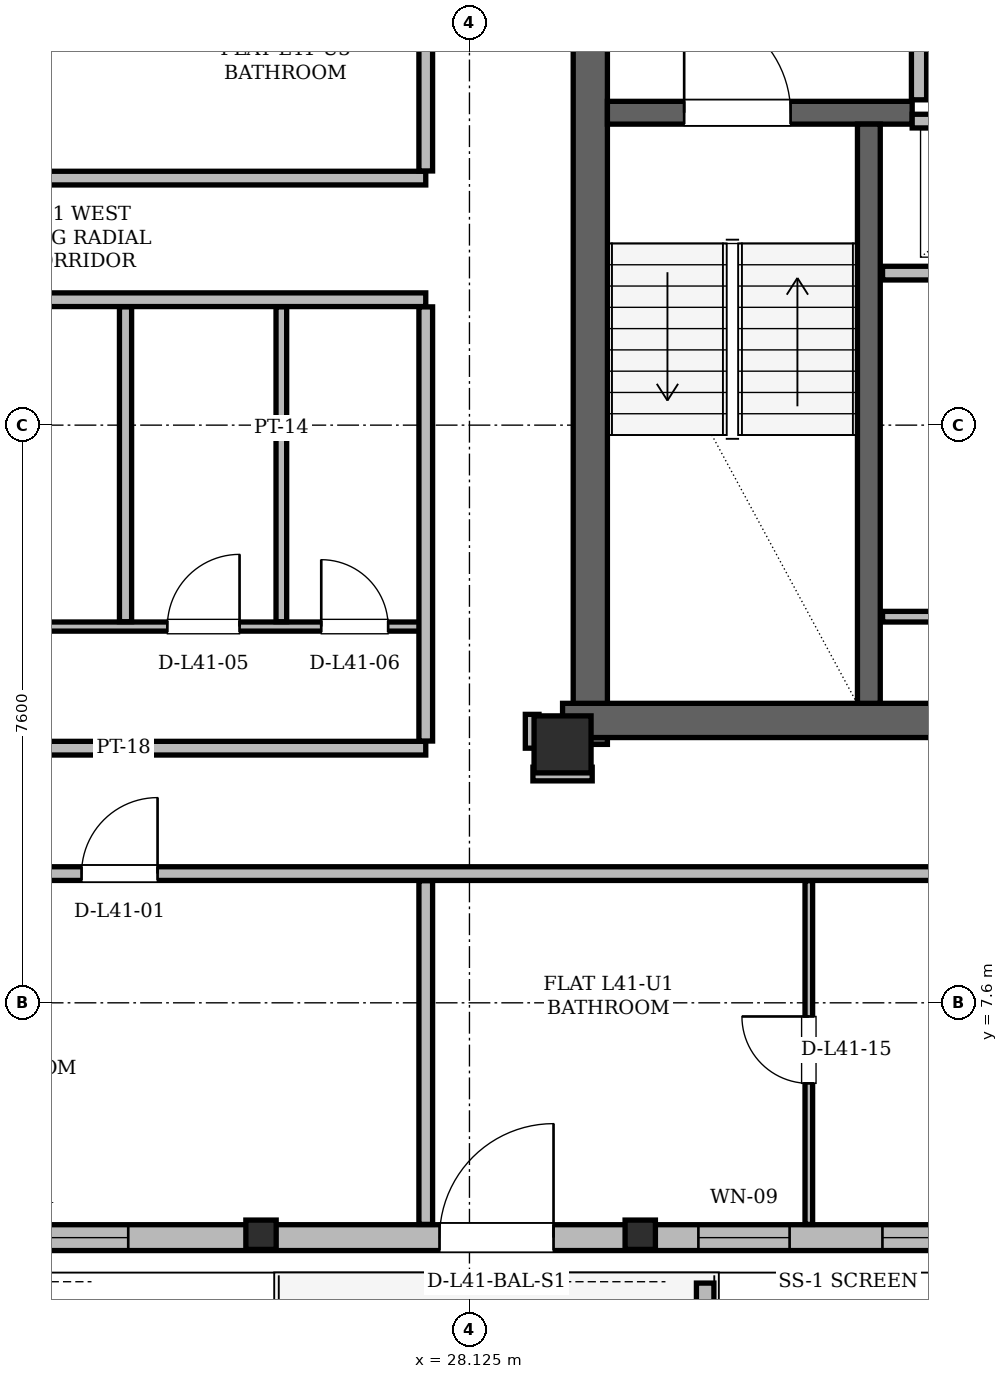
"""IFC4 building model, lengths in metres.
Left out: names, types, materials, properties, quantities, classifications, styles, units other than length and angle.
Written with IfcOpenShell. Run it as: python <this file> out.ifc"""

import sys

from ifc_helpers import new_model, si_unit, direction, frame, frame_2d, origin, origin_2d, place, context, subcontext, project, spatial, polyline, rectangle, hollow_rectangle, i_section, outline, extrude, element, fill, save


model = new_model("IFC4")
c1 = context("Model", 3, precision=1e-05, world=origin(), true_north=direction((0.0, 1.0)))
c2 = subcontext(c1, "Body", "Model", "MODEL_VIEW")
j1 = project(units=[si_unit("LENGTHUNIT", "METRE"), si_unit("PLANEANGLEUNIT", "RADIAN")], contexts=[c1])
p1 = place(None, origin())
s1 = spatial("IfcSite", under=j1, at=p1, CompositionType="ELEMENT")
p2 = place(p1, origin())
s2 = spatial("IfcBuilding", under=s1, at=p2, CompositionType="ELEMENT")
p3 = place(p2, frame((0.0, 0.0, 156.6)))
s3 = spatial("IfcBuildingStorey", under=s2, at=p3, CompositionType="ELEMENT", Elevation=156.6)
p4 = place(p3, frame((29.35, 11.0, 0.0), z_axis=(0.0, 0.0, 1.0), x_axis=(1.0, 0.0, 0.0)))
e1 = element("IfcColumn", 1, at=p4, inside=s3, PredefinedType="COLUMN", context=c2, shape_type="SweptSolid", body=[
    extrude(hollow_rectangle(XDim=0.75, YDim=0.75, WallThickness=0.06, at=origin_2d()), origin(), (0.0, 0.0, 1.0), 3.6),
])
p5 = place(p3, frame((25.394, 4.511, 0.004), z_axis=(-0.006253154148, 0.021138379783, 0.999757003958), x_axis=(-0.958922443526, -0.283668375577, 0.0)))
e2 = element("IfcColumn", 2, at=p5, inside=s3, PredefinedType="COLUMN", context=c2, shape_type="SweptSolid", body=[
    extrude(i_section(OverallWidth=0.399, OverallDepth=0.386, WebThickness=0.021, FlangeThickness=0.033, at=origin_2d()), origin(), (0.0, 0.0, 1.0), 3.592),
])
p6 = place(p3, frame((30.379, 4.511, 0.004), z_axis=(-0.003670376646, 0.021138650683, 0.999769816399), x_axis=(-0.985258221768, -0.171073774841, 0.0)))
e3 = element("IfcColumn", 3, at=p6, inside=s3, PredefinedType="COLUMN", context=c2, shape_type="SweptSolid", body=[
    extrude(i_section(OverallWidth=0.399, OverallDepth=0.386, WebThickness=0.021, FlangeThickness=0.033, at=origin_2d()), origin(), (0.0, 0.0, 1.0), 3.592),
])
p7 = place(p3, frame((29.715, 11.0, 0.0), z_axis=(0.0, 0.0, 1.0), x_axis=(0.0, 1.0, 0.0)))
e4 = element("IfcWall", 4, at=p7, inside=s3, PredefinedType="SHEAR", context=c2, shape_type="SweptSolid", body=[
    extrude(rectangle(XDim=13.3, YDim=0.45, at=frame_2d((6.65, 0.0))), origin(), (0.0, 0.0, 1.0), 3.38),
])
p8 = place(p3, frame((29.35, 11.315, 0.0), z_axis=(0.0, 0.0, 1.0), x_axis=(1.0, 0.0, 0.0)))
e5 = element("IfcWall", 5, at=p8, inside=s3, PredefinedType="SHEAR", context=c2, shape_type="SweptSolid", body=[
    extrude(rectangle(XDim=7.1, YDim=0.45, at=frame_2d((3.55, 0.0))), origin(), (0.0, 0.0, 1.0), 3.38),
])
p9 = place(p3, frame((29.94, 19.31, 0.0), z_axis=(0.0, 0.0, 1.0), x_axis=(1.0, 0.0, 0.0)))
e6 = element("IfcWall", 6, at=p9, inside=s3, PredefinedType="SHEAR", context=c2, shape_type="SweptSolid", body=[
    extrude(rectangle(XDim=4.01, YDim=0.3, at=frame_2d((2.005, 0.0))), origin(), (0.0, 0.0, 1.0), 3.38),
])
p10 = place(p9, frame((1.01, 0.0, 0.0)))
e7 = element("IfcOpeningElement", 7, at=p10, cuts=e6, PredefinedType="OPENING", context=c2, shape_type="SweptSolid", body=[
    extrude(rectangle(XDim=1.4, YDim=2.2, at=frame_2d((0.7, 1.1))), frame((0.0, 0.15, 0.0), z_axis=(0.0, -1.0, 0.0), x_axis=(1.0, 0.0, 0.0)), (0.0, 0.0, 1.0), 0.3),
])
p11 = place(p3, frame((33.38, 11.54, 0.0), z_axis=(0.0, 0.0, 1.0), x_axis=(0.0, 1.0, 0.0)))
e8 = element("IfcWall", 8, at=p11, inside=s3, PredefinedType="SHEAR", context=c2, shape_type="SweptSolid", body=[
    extrude(rectangle(XDim=7.62, YDim=0.3, at=frame_2d((3.81, 0.0))), origin(), (0.0, 0.0, 1.0), 3.38),
])
p12 = place(p3, frame((19.697, 4.511, 0.0), z_axis=(0.0, 0.0, 1.0), x_axis=(1.0, 0.0, 0.0)))
e9 = element("IfcWall", 9, at=p12, inside=s3, PredefinedType="SOLIDWALL", context=c2, shape_type="SweptSolid", body=[
    extrude(rectangle(XDim=35.606, YDim=0.34, at=frame_2d((17.803, 0.0))), origin(), (0.0, 0.0, 1.0), 2.6),
])
p13 = place(p12, frame((8.034, 0.0, 0.0)))
e10 = element("IfcOpeningElement", 10, at=p13, cuts=e9, PredefinedType="OPENING", context=c2, shape_type="SweptSolid", body=[
    extrude(rectangle(XDim=1.5, YDim=2.2, at=frame_2d((0.75, 1.1))), frame((0.0, 0.17, 0.0), z_axis=(0.0, -1.0, 0.0), x_axis=(1.0, 0.0, 0.0)), (0.0, 0.0, 1.0), 0.34),
])
p14 = place(p12, frame((27.737, 0.0, 0.0)))
e11 = element("IfcOpeningElement", 11, at=p14, cuts=e9, PredefinedType="OPENING", context=c2, shape_type="SweptSolid", body=[
    extrude(rectangle(XDim=1.5, YDim=2.2, at=frame_2d((0.75, 1.1))), frame((0.0, 0.17, 0.0), z_axis=(0.0, -1.0, 0.0), x_axis=(1.0, 0.0, 0.0)), (0.0, 0.0, 1.0), 0.34),
])
p15 = place(p12, frame((13.862, 0.0, 0.85)))
e12 = element("IfcOpeningElement", 12, at=p15, cuts=e9, PredefinedType="OPENING", context=c2, shape_type="SweptSolid", body=[
    extrude(rectangle(XDim=3.0, YDim=1.64, at=frame_2d((1.5, 0.82))), frame((0.0, 0.17, 0.0), z_axis=(0.0, -1.0, 0.0), x_axis=(1.0, 0.0, 0.0)), (0.0, 0.0, 1.0), 0.34),
])
p16 = place(p12, frame((20.838, 0.0, 0.85)))
e13 = element("IfcOpeningElement", 13, at=p16, cuts=e9, PredefinedType="OPENING", context=c2, shape_type="SweptSolid", body=[
    extrude(rectangle(XDim=2.6, YDim=1.64, at=frame_2d((1.3, 0.82))), frame((0.0, 0.17, 0.0), z_axis=(0.0, -1.0, 0.0), x_axis=(1.0, 0.0, 0.0)), (0.0, 0.0, 1.0), 0.34),
])
p17 = place(p12, frame((11.44, 0.0, 0.85)))
e14 = element("IfcOpeningElement", 14, at=p17, cuts=e9, PredefinedType="OPENING", context=c2, shape_type="SweptSolid", body=[
    extrude(rectangle(XDim=1.2, YDim=1.48, at=frame_2d((0.6, 0.74))), frame((0.0, 0.17, 0.0), z_axis=(0.0, -1.0, 0.0), x_axis=(1.0, 0.0, 0.0)), (0.0, 0.0, 1.0), 0.34),
])
p18 = place(p12, frame((1.139, 0.0, 0.85)))
e15 = element("IfcOpeningElement", 15, at=p18, cuts=e9, PredefinedType="OPENING", context=c2, shape_type="SweptSolid", body=[
    extrude(rectangle(XDim=2.8, YDim=1.64, at=frame_2d((1.4, 0.82))), frame((0.0, 0.17, 0.0), z_axis=(0.0, -1.0, 0.0), x_axis=(1.0, 0.0, 0.0)), (0.0, 0.0, 1.0), 0.34),
])
p19 = place(p12, frame((31.095, 0.0, 0.85)))
e16 = element("IfcOpeningElement", 16, at=p19, cuts=e9, PredefinedType="OPENING", context=c2, shape_type="SweptSolid", body=[
    extrude(rectangle(XDim=3.0, YDim=1.64, at=frame_2d((1.5, 0.82))), frame((0.0, 0.17, 0.0), z_axis=(0.0, -1.0, 0.0), x_axis=(1.0, 0.0, 0.0)), (0.0, 0.0, 1.0), 0.34),
])
p20 = place(p3, frame((32.901, 43.313, 0.0), z_axis=(0.0, 0.0, 1.0), x_axis=(-0.499998839087, -0.866026074037, 0.0)))
e17 = element("IfcWall", 17, at=p20, inside=s3, PredefinedType="SOLIDWALL", context=c2, shape_type="SweptSolid", body=[
    extrude(rectangle(XDim=35.606, YDim=0.34, at=frame_2d((17.803, 0.0))), origin(), (0.0, 0.0, 1.0), 2.6),
])
p21 = place(p20, frame((8.034, 0.0, 0.0)))
e18 = element("IfcOpeningElement", 18, at=p21, cuts=e17, PredefinedType="OPENING", context=c2, shape_type="SweptSolid", body=[
    extrude(rectangle(XDim=1.5, YDim=2.2, at=frame_2d((0.75, 1.1))), frame((0.0, 0.17, 0.0), z_axis=(0.0, -1.0, 0.0), x_axis=(1.0, 0.0, 0.0)), (0.0, 0.0, 1.0), 0.34),
])
p22 = place(p20, frame((30.887, 0.0, 0.0)))
e19 = element("IfcOpeningElement", 19, at=p22, cuts=e17, PredefinedType="OPENING", context=c2, shape_type="SweptSolid", body=[
    extrude(rectangle(XDim=1.5, YDim=2.2, at=frame_2d((0.75, 1.1))), frame((0.0, 0.17, 0.0), z_axis=(0.0, -1.0, 0.0), x_axis=(1.0, 0.0, 0.0)), (0.0, 0.0, 1.0), 0.34),
])
p23 = place(p20, frame((33.096, 0.0, 0.85)))
e20 = element("IfcOpeningElement", 20, at=p23, cuts=e17, PredefinedType="OPENING", context=c2, shape_type="SweptSolid", body=[
    extrude(rectangle(XDim=1.2, YDim=1.48, at=frame_2d((0.6, 0.74))), frame((0.0, 0.17, 0.0), z_axis=(0.0, -1.0, 0.0), x_axis=(1.0, 0.0, 0.0)), (0.0, 0.0, 1.0), 0.34),
])
p24 = place(p20, frame((13.168, 0.0, 0.85)))
e21 = element("IfcOpeningElement", 21, at=p24, cuts=e17, PredefinedType="OPENING", context=c2, shape_type="SweptSolid", body=[
    extrude(rectangle(XDim=1.2, YDim=1.48, at=frame_2d((0.6, 0.74))), frame((0.0, 0.17, 0.0), z_axis=(0.0, -1.0, 0.0), x_axis=(1.0, 0.0, 0.0)), (0.0, 0.0, 1.0), 0.34),
])
p25 = place(p20, frame((20.876, 0.0, 0.85)))
e22 = element("IfcOpeningElement", 22, at=p25, cuts=e17, PredefinedType="OPENING", context=c2, shape_type="SweptSolid", body=[
    extrude(rectangle(XDim=2.8, YDim=1.64, at=frame_2d((1.4, 0.82))), frame((0.0, 0.17, 0.0), z_axis=(0.0, -1.0, 0.0), x_axis=(1.0, 0.0, 0.0)), (0.0, 0.0, 1.0), 0.34),
])
p26 = place(p20, frame((2.906, 0.0, 0.85)))
e23 = element("IfcOpeningElement", 23, at=p26, cuts=e17, PredefinedType="OPENING", context=c2, shape_type="SweptSolid", body=[
    extrude(rectangle(XDim=1.6, YDim=1.64, at=frame_2d((0.8, 0.82))), frame((0.0, 0.17, 0.0), z_axis=(0.0, -1.0, 0.0), x_axis=(1.0, 0.0, 0.0)), (0.0, 0.0, 1.0), 0.34),
])
p27 = place(p3, frame((31.226, 3.913, 0.0), z_axis=(0.0, 0.0, 1.0), x_axis=(0.0, -1.0, 0.0)))
e24 = element("IfcWall", 24, at=p27, inside=s3, PredefinedType="PARAPET", context=c2, shape_type="SweptSolid", body=[
    extrude(outline(polyline([(0.0, 0.0), (2.042, 0.0), (2.042, 1.1), (0.0, 1.32), (0.0, 0.0)])), frame((0.0, 0.115, 0.0), z_axis=(0.0, -1.0, 0.0), x_axis=(1.0, 0.0, 0.0)), (0.0, 0.0, 1.0), 0.23),
])
p28 = place(p3, frame((34.04, 19.48, 0.0), z_axis=(0.0, 0.0, 1.0), x_axis=(0.0, 1.0, 0.0)))
e25 = element("IfcWall", 25, at=p28, inside=s3, PredefinedType="PARTITIONING", context=c2, shape_type="SweptSolid", body=[
    extrude(rectangle(XDim=4.5, YDim=0.2, at=frame_2d((2.25, 0.0))), origin(), (0.0, 0.0, 1.0), 2.42),
])
p29 = place(p28, frame((2.12, 0.0, 0.0)))
e26 = element("IfcOpeningElement", 26, at=p29, cuts=e25, PredefinedType="OPENING", context=c2, shape_type="SweptSolid", body=[
    extrude(rectangle(XDim=1.1, YDim=2.2, at=frame_2d((0.55, 1.1))), frame((0.0, 0.1, 0.0), z_axis=(0.0, -1.0, 0.0), x_axis=(1.0, 0.0, 0.0)), (0.0, 0.0, 1.0), 0.2),
])
p30 = place(p3, frame((33.95, 19.2, 0.0), z_axis=(0.0, 0.0, 1.0), x_axis=(1.0, 0.0, 0.0)))
e27 = element("IfcWall", 27, at=p30, inside=s3, PredefinedType="PARTITIONING", context=c2, shape_type="SweptSolid", body=[
    extrude(rectangle(XDim=2.27, YDim=0.18, at=frame_2d((1.135, 0.0))), origin(), (0.0, 0.0, 1.0), 3.38),
])
p31 = place(p3, frame((33.56, 17.2, 0.0), z_axis=(0.0, 0.0, 1.0), x_axis=(1.0, 0.0, 0.0)))
e28 = element("IfcWall", 28, at=p31, inside=s3, PredefinedType="PARTITIONING", context=c2, shape_type="SweptSolid", body=[
    extrude(rectangle(XDim=2.66, YDim=0.18, at=frame_2d((1.33, 0.0))), origin(), (0.0, 0.0, 1.0), 3.38),
])
p32 = place(p3, frame((33.56, 12.68, 0.0), z_axis=(0.0, 0.0, 1.0), x_axis=(1.0, 0.0, 0.0)))
e29 = element("IfcWall", 29, at=p32, inside=s3, PredefinedType="PARTITIONING", context=c2, shape_type="SweptSolid", body=[
    extrude(rectangle(XDim=2.66, YDim=0.14, at=frame_2d((1.33, 0.0))), origin(), (0.0, 0.0, 1.0), 3.38),
])
p33 = place(p3, frame((19.6, 9.3, 0.0), z_axis=(0.0, 0.0, 1.0), x_axis=(1.0, 0.0, 0.0)))
e30 = element("IfcWall", 30, at=p33, inside=s3, PredefinedType="PARTITIONING", context=c2, shape_type="SweptSolid", body=[
    extrude(rectangle(XDim=30.4, YDim=0.18, at=frame_2d((15.2, 0.0))), origin(), (0.0, 0.0, 1.0), 2.842),
])
p34 = place(p33, frame((3.421, 0.0, 0.0)))
e31 = element("IfcOpeningElement", 31, at=p34, cuts=e30, PredefinedType="OPENING", context=c2, shape_type="SweptSolid", body=[
    extrude(rectangle(XDim=1.0, YDim=2.18, at=frame_2d((0.5, 1.09))), frame((0.0, 0.09, 0.0), z_axis=(0.0, -1.0, 0.0), x_axis=(1.0, 0.0, 0.0)), (0.0, 0.0, 1.0), 0.18),
])
p35 = place(p33, frame((18.902, 0.0, 0.0)))
e32 = element("IfcOpeningElement", 32, at=p35, cuts=e30, PredefinedType="OPENING", context=c2, shape_type="SweptSolid", body=[
    extrude(rectangle(XDim=1.0, YDim=2.18, at=frame_2d((0.5, 1.09))), frame((0.0, 0.09, 0.0), z_axis=(0.0, -1.0, 0.0), x_axis=(1.0, 0.0, 0.0)), (0.0, 0.0, 1.0), 0.18),
])
p36 = place(p33, frame((28.532, 0.0, 0.0)))
e33 = element("IfcOpeningElement", 33, at=p36, cuts=e30, PredefinedType="OPENING", context=c2, shape_type="SweptSolid", body=[
    extrude(rectangle(XDim=1.0, YDim=2.18, at=frame_2d((0.5, 1.09))), frame((0.0, 0.09, 0.0), z_axis=(0.0, -1.0, 0.0), x_axis=(1.0, 0.0, 0.0)), (0.0, 0.0, 1.0), 0.18),
])
p37 = place(p3, frame((28.96, 10.61, 0.0), z_axis=(0.0, 0.0, 1.0), x_axis=(1.0, 0.0, 0.0)))
e34 = element("IfcWall", 34, at=p37, inside=s3, PredefinedType="PARTITIONING", context=c2, shape_type="SweptSolid", body=[
    extrude(rectangle(XDim=0.78, YDim=0.18, at=frame_2d((0.39, 0.0))), origin(), (0.0, 0.0, 1.0), 3.38),
])
p38 = place(p3, frame((19.6, 10.95, 0.0), z_axis=(0.0, 0.0, 1.0), x_axis=(1.0, 0.0, 0.0)))
e35 = element("IfcWall", 35, at=p38, inside=s3, PredefinedType="PARTITIONING", context=c2, shape_type="SweptSolid", body=[
    extrude(rectangle(XDim=7.95, YDim=0.18, at=frame_2d((3.975, 0.0))), origin(), (0.0, 0.0, 1.0), 3.38),
])
p39 = place(p3, frame((15.487, 12.55, 0.0), z_axis=(0.0, 0.0, 1.0), x_axis=(1.0, 0.0, 0.0)))
e36 = element("IfcWall", 36, at=p39, inside=s3, PredefinedType="PARTITIONING", context=c2, shape_type="SweptSolid", body=[
    extrude(rectangle(XDim=12.113, YDim=0.12, at=frame_2d((6.056, 0.0))), origin(), (0.0, 0.0, 1.0), 3.38),
])
p40 = place(p39, frame((3.494, 0.0, 0.0)))
e37 = element("IfcOpeningElement", 37, at=p40, cuts=e36, PredefinedType="OPENING", context=c2, shape_type="SweptSolid", body=[
    extrude(rectangle(XDim=0.92, YDim=2.12, at=frame_2d((0.46, 1.06))), frame((0.0, 0.06, 0.0), z_axis=(0.0, -1.0, 0.0), x_axis=(1.0, 0.0, 0.0)), (0.0, 0.0, 1.0), 0.12),
])
p41 = place(p39, frame((8.663, 0.0, 0.0)))
e38 = element("IfcOpeningElement", 38, at=p41, cuts=e36, PredefinedType="OPENING", context=c2, shape_type="SweptSolid", body=[
    extrude(rectangle(XDim=0.95, YDim=2.1, at=frame_2d((0.475, 1.05))), frame((0.0, 0.06, 0.0), z_axis=(0.0, -1.0, 0.0), x_axis=(1.0, 0.0, 0.0)), (0.0, 0.0, 1.0), 0.12),
])
p42 = place(p39, frame((10.688, 0.0, 0.0)))
e39 = element("IfcOpeningElement", 39, at=p42, cuts=e36, PredefinedType="OPENING", context=c2, shape_type="SweptSolid", body=[
    extrude(rectangle(XDim=0.88, YDim=2.08, at=frame_2d((0.44, 1.04))), frame((0.0, 0.06, 0.0), z_axis=(0.0, -1.0, 0.0), x_axis=(1.0, 0.0, 0.0)), (0.0, 0.0, 1.0), 0.12),
])
p43 = place(p3, frame((17.823, 16.85, 0.0), z_axis=(0.0, 0.0, 1.0), x_axis=(1.0, 0.0, 0.0)))
e40 = element("IfcWall", 40, at=p43, inside=s3, PredefinedType="PARTITIONING", context=c2, shape_type="SweptSolid", body=[
    extrude(rectangle(XDim=9.727, YDim=0.18, at=frame_2d((4.863, 0.0))), origin(), (0.0, 0.0, 1.0), 3.38),
])
p44 = place(p3, frame((18.747, 18.45, 0.0), z_axis=(0.0, 0.0, 1.0), x_axis=(1.0, 0.0, 0.0)))
e41 = element("IfcWall", 41, at=p44, inside=s3, PredefinedType="PARTITIONING", context=c2, shape_type="SweptSolid", body=[
    extrude(rectangle(XDim=8.803, YDim=0.18, at=frame_2d((4.401, 0.0))), origin(), (0.0, 0.0, 1.0), 3.38),
])
p45 = place(p3, frame((23.6, 12.614, 0.0), z_axis=(0.0, 0.0, 1.0), x_axis=(0.0, 1.0, 0.0)))
e42 = element("IfcWall", 42, at=p45, inside=s3, PredefinedType="PARTITIONING", context=c2, shape_type="SweptSolid", body=[
    extrude(rectangle(XDim=4.142, YDim=0.16, at=frame_2d((2.071, 0.0))), origin(), (0.0, 0.0, 1.0), 3.38),
])
p46 = place(p3, frame((25.65, 12.614, 0.0), z_axis=(0.0, 0.0, 1.0), x_axis=(0.0, 1.0, 0.0)))
e43 = element("IfcWall", 43, at=p46, inside=s3, PredefinedType="PARTITIONING", context=c2, shape_type="SweptSolid", body=[
    extrude(rectangle(XDim=4.142, YDim=0.14, at=frame_2d((2.071, 0.0))), origin(), (0.0, 0.0, 1.0), 3.38),
])
p47 = place(p3, frame((27.55, 4.685, 0.0), z_axis=(0.0, 0.0, 1.0), x_axis=(0.0, 1.0, 0.0)))
e44 = element("IfcWall", 44, at=p47, inside=s3, PredefinedType="PARTITIONING", context=c2, shape_type="SweptSolid", body=[
    extrude(rectangle(XDim=4.521, YDim=0.18, at=frame_2d((2.261, 0.0))), origin(), (0.0, 0.0, 1.0), 2.966),
])
p48 = place(p3, frame((27.55, 11.044, 0.0), z_axis=(0.0, 0.0, 1.0), x_axis=(0.0, 1.0, 0.0)))
e45 = element("IfcWall", 45, at=p48, inside=s3, PredefinedType="PARTITIONING", context=c2, shape_type="SweptSolid", body=[
    extrude(rectangle(XDim=5.712, YDim=0.18, at=frame_2d((2.856, 0.0))), origin(), (0.0, 0.0, 1.0), 2.842),
])
p49 = place(p3, frame((27.55, 18.544, 0.0), z_axis=(0.0, 0.0, 1.0), x_axis=(0.0, 1.0, 0.0)))
e46 = element("IfcWall", 46, at=p49, inside=s3, PredefinedType="PARTITIONING", context=c2, shape_type="SweptSolid", body=[
    extrude(rectangle(XDim=15.153, YDim=0.18, at=frame_2d((7.576, 0.0))), origin(), (0.0, 0.0, 1.0), 3.38),
])
p50 = place(p49, frame((3.68, 0.0, 0.0)))
e47 = element("IfcOpeningElement", 47, at=p50, cuts=e46, PredefinedType="OPENING", context=c2, shape_type="SweptSolid", body=[
    extrude(rectangle(XDim=1.0, YDim=2.18, at=frame_2d((0.5, 1.09))), frame((0.0, 0.09, 0.0), z_axis=(0.0, -1.0, 0.0), x_axis=(1.0, 0.0, 0.0)), (0.0, 0.0, 1.0), 0.18),
])
p51 = place(p3, frame((28.95, 10.95, 0.0), z_axis=(0.0, 0.0, 1.0), x_axis=(0.0, 1.0, 0.0)))
e48 = element("IfcWall", 48, at=p51, inside=s3, PredefinedType="PARTITIONING", context=c2, shape_type="SweptSolid", body=[
    extrude(rectangle(XDim=0.445, YDim=0.18, at=frame_2d((0.223, 0.0))), origin(), (0.0, 0.0, 1.0), 2.842),
])
p52 = place(p3, frame((32.59, 4.685, 0.0), z_axis=(0.0, 0.0, 1.0), x_axis=(0.0, 1.0, 0.0)))
e49 = element("IfcWall", 49, at=p52, inside=s3, PredefinedType="PARTITIONING", context=c2, shape_type="SweptSolid", body=[
    extrude(rectangle(XDim=4.521, YDim=0.1, at=frame_2d((2.261, 0.0))), origin(), (0.0, 0.0, 1.0), 2.966),
])
p53 = place(p52, frame((1.856, 0.0, 0.0)))
e50 = element("IfcOpeningElement", 50, at=p53, cuts=e49, PredefinedType="OPENING", context=c2, shape_type="SweptSolid", body=[
    extrude(rectangle(XDim=0.88, YDim=2.08, at=frame_2d((0.44, 1.04))), frame((0.0, 0.05, 0.0), z_axis=(0.0, -1.0, 0.0), x_axis=(1.0, 0.0, 0.0)), (0.0, 0.0, 1.0), 0.1),
])
p54 = place(p13, origin())
e51 = element("IfcDoor", 51, at=p54, inside=s3, OperationType="SINGLE_SWING_RIGHT", PredefinedType="DOOR", context=c2, shape_type="SweptSolid", body=[
    extrude(rectangle(XDim=1.5, YDim=2.2, at=frame_2d((0.75, 1.1))), frame((0.0, 0.025, 0.0), z_axis=(0.0, -1.0, 0.0), x_axis=(1.0, 0.0, 0.0)), (0.0, 0.0, 1.0), 0.05),
])
fill(e10, e51)
p55 = place(p15, origin())
e52 = element("IfcWindow", 52, at=p55, inside=s3, PartitioningType="SINGLE_PANEL", PredefinedType="WINDOW", context=c2, shape_type="SweptSolid", body=[
    extrude(rectangle(XDim=3.0, YDim=1.64, at=frame_2d((1.5, 0.82))), frame((0.0, 0.03, 0.0), z_axis=(0.0, -1.0, 0.0), x_axis=(1.0, 0.0, 0.0)), (0.0, 0.0, 1.0), 0.06),
])
fill(e12, e52)
p56 = place(p17, origin())
e53 = element("IfcWindow", 53, at=p56, inside=s3, PartitioningType="SINGLE_PANEL", PredefinedType="WINDOW", context=c2, shape_type="SweptSolid", body=[
    extrude(rectangle(XDim=1.2, YDim=1.48, at=frame_2d((0.6, 0.74))), frame((0.0, 0.03, 0.0), z_axis=(0.0, -1.0, 0.0), x_axis=(1.0, 0.0, 0.0)), (0.0, 0.0, 1.0), 0.06),
])
fill(e14, e53)
p57 = place(p18, origin())
e54 = element("IfcWindow", 54, at=p57, inside=s3, PartitioningType="SINGLE_PANEL", PredefinedType="WINDOW", context=c2, shape_type="SweptSolid", body=[
    extrude(rectangle(XDim=2.8, YDim=1.64, at=frame_2d((1.4, 0.82))), frame((0.0, 0.03, 0.0), z_axis=(0.0, -1.0, 0.0), x_axis=(1.0, 0.0, 0.0)), (0.0, 0.0, 1.0), 0.06),
])
fill(e15, e54)
p58 = place(p10, origin())
e55 = element("IfcDoor", 55, at=p58, inside=s3, OperationType="SINGLE_SWING_LEFT", PredefinedType="DOOR", context=c2, shape_type="SweptSolid", body=[
    extrude(rectangle(XDim=1.4, YDim=2.2, at=frame_2d((0.7, 1.1))), frame((0.0, 0.025, 0.0), z_axis=(0.0, -1.0, 0.0), x_axis=(1.0, 0.0, 0.0)), (0.0, 0.0, 1.0), 0.05),
])
fill(e7, e55)
p59 = place(p34, origin())
e56 = element("IfcDoor", 56, at=p59, inside=s3, OperationType="SINGLE_SWING_RIGHT", PredefinedType="DOOR", context=c2, shape_type="SweptSolid", body=[
    extrude(rectangle(XDim=1.0, YDim=2.18, at=frame_2d((0.5, 1.09))), frame((0.0, 0.025, 0.0), z_axis=(0.0, -1.0, 0.0), x_axis=(1.0, 0.0, 0.0)), (0.0, 0.0, 1.0), 0.05),
])
fill(e31, e56)
p60 = place(p41, origin())
e57 = element("IfcDoor", 57, at=p60, inside=s3, OperationType="SINGLE_SWING_RIGHT", PredefinedType="DOOR", context=c2, shape_type="SweptSolid", body=[
    extrude(rectangle(XDim=0.95, YDim=2.1, at=frame_2d((0.475, 1.05))), frame((0.0, 0.025, 0.0), z_axis=(0.0, -1.0, 0.0), x_axis=(1.0, 0.0, 0.0)), (0.0, 0.0, 1.0), 0.05),
])
fill(e38, e57)
p61 = place(p42, origin())
e58 = element("IfcDoor", 58, at=p61, inside=s3, OperationType="SINGLE_SWING_LEFT", PredefinedType="DOOR", context=c2, shape_type="SweptSolid", body=[
    extrude(rectangle(XDim=0.88, YDim=2.08, at=frame_2d((0.44, 1.04))), frame((0.0, 0.025, 0.0), z_axis=(0.0, -1.0, 0.0), x_axis=(1.0, 0.0, 0.0)), (0.0, 0.0, 1.0), 0.05),
])
fill(e39, e58)
p62 = place(p53, origin())
e59 = element("IfcDoor", 59, at=p62, inside=s3, OperationType="SINGLE_SWING_RIGHT", PredefinedType="DOOR", context=c2, shape_type="SweptSolid", body=[
    extrude(rectangle(XDim=0.88, YDim=2.08, at=frame_2d((0.44, 1.04))), frame((0.0, 0.025, 0.0), z_axis=(0.0, -1.0, 0.0), x_axis=(1.0, 0.0, 0.0)), (0.0, 0.0, 1.0), 0.05),
])
fill(e50, e59)
save(model, sys.argv[1])
